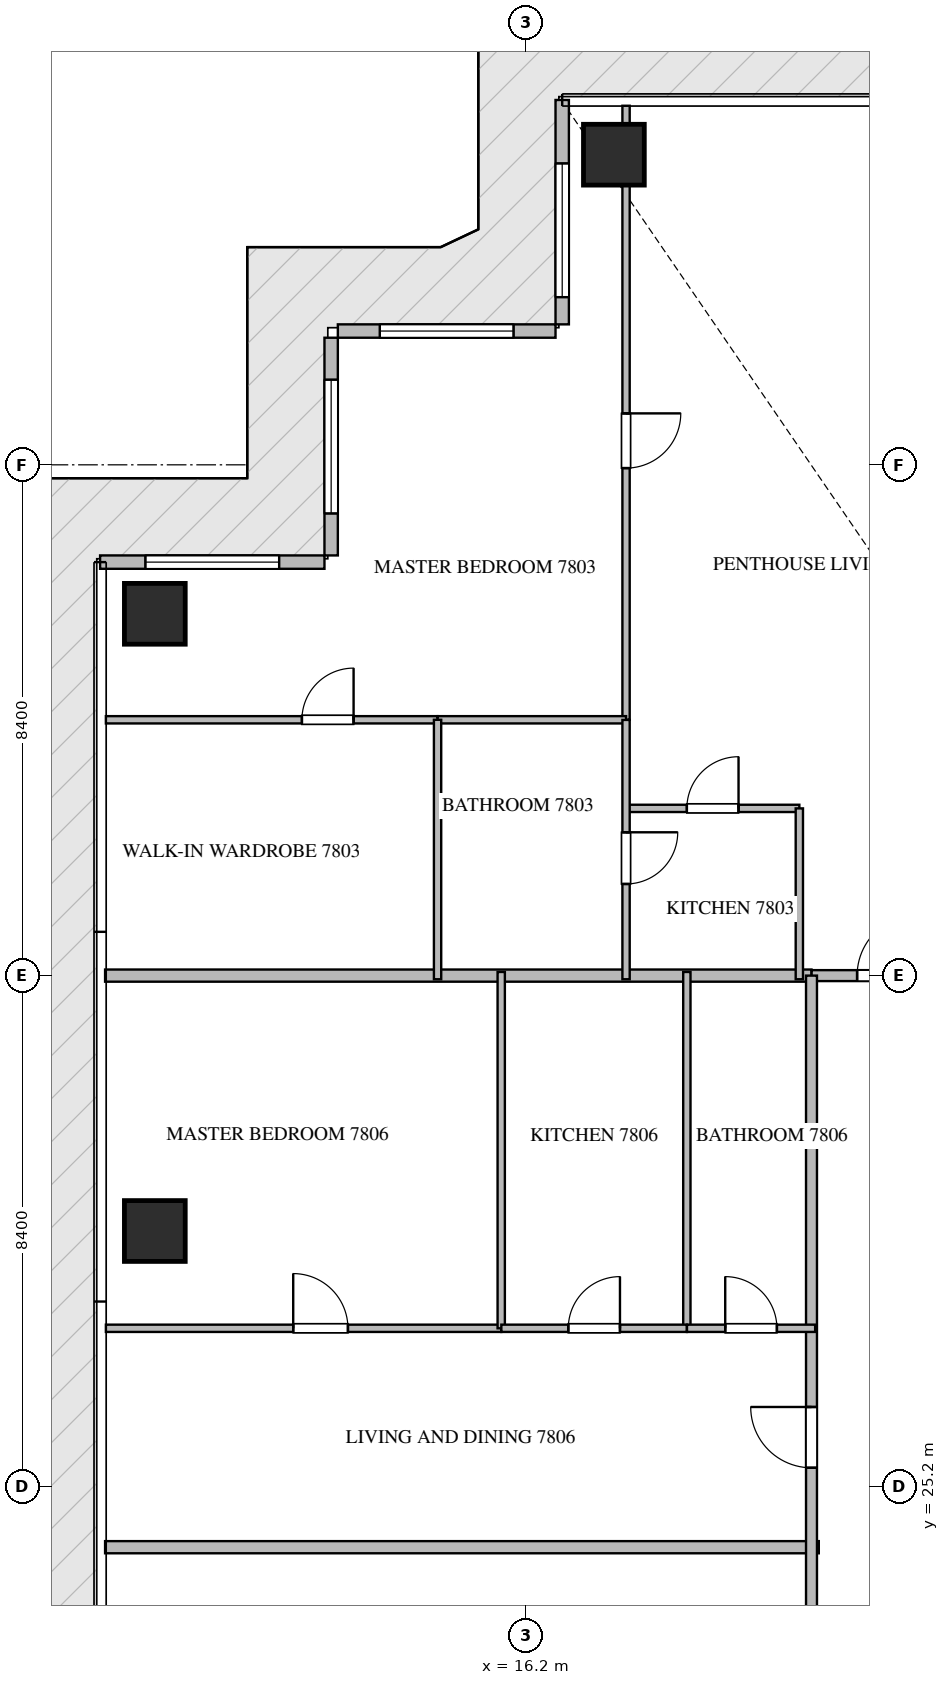
"""IFC4 building model, lengths in metres.
Left out: names, types, materials, properties, quantities, classifications, styles, units other than length and angle.
Written with IfcOpenShell. Run it as: python <this file> out.ifc"""

import sys

from ifc_helpers import new_model, si_unit, direction, frame, frame_2d, origin, origin_2d, place, context, subcontext, project, spatial, rectangle, extrude, source, transform, mapped, element, fill, save


model = new_model("IFC4")
c1 = context("Model", 3, precision=1e-05, world=origin(), true_north=direction((0.0, 1.0)))
c2 = subcontext(c1, "Body", "Model", "MODEL_VIEW")
j1 = project(units=[si_unit("LENGTHUNIT", "METRE"), si_unit("PLANEANGLEUNIT", "RADIAN")], contexts=[c1])
p1 = place(None, origin())
s1 = spatial("IfcSite", under=j1, at=p1, CompositionType="ELEMENT")
p2 = place(p1, origin())
s2 = spatial("IfcBuilding", under=s1, at=p2, CompositionType="ELEMENT")
p3 = place(p2, frame((0.0, 0.0, 313.7)))
s3 = spatial("IfcBuildingStorey", under=s2, at=p3, CompositionType="ELEMENT", Elevation=313.7)
m1 = source(origin(), c2, "Body", "SweptSolid", [
    extrude(rectangle(XDim=1.0, YDim=1.0, at=origin_2d()), origin(), (0.0, 0.0, 1.0), 4.05),
])
for number, where, z_axis, x_axis in (
    (1, (17.65, 47.1, -0.26), (0.0, 0.0, 1.0), (1.0, 0.0, 0.0)),
    (2, (10.1, 29.4, -0.26), (0.0, 0.0, 1.0), (1.0, 0.0, 0.0)),
    (3, (10.1, 39.55, -0.26), (0.0, 0.0, 1.0), (1.0, 0.0, 0.0)),
):
    element("IfcColumn", number, at=place(p3, frame(where, z_axis=z_axis, x_axis=x_axis)), inside=s3, PredefinedType="COLUMN", context=c2, shape_type="MappedRepresentation", body=[
        mapped(m1, transform((0.0, 0.0, 0.0), scale=1.0)),
    ])
p4 = place(p3, frame((16.8, 48.0, 0.0), z_axis=(0.0, 0.0, 1.0), x_axis=(0.0, -1.0, 0.0)))
e4 = element("IfcWall", 4, at=p4, inside=s3, PredefinedType="ELEMENTEDWALL", context=c2, shape_type="SweptSolid", body=[
    extrude(rectangle(XDim=3.69, YDim=0.22, at=frame_2d((1.845, 0.0))), origin(), (0.0, 0.0, 1.0), 3.775),
])
p5 = place(p4, frame((1.043, 0.0, 0.65)))
e5 = element("IfcOpeningElement", 5, at=p5, cuts=e4, PredefinedType="OPENING", context=c2, shape_type="SweptSolid", body=[
    extrude(rectangle(XDim=2.2, YDim=2.4, at=frame_2d((1.1, 1.2))), frame((0.0, 0.12, 0.0), z_axis=(0.0, -1.0, 0.0), x_axis=(1.0, 0.0, 0.0)), (0.0, 0.0, 1.0), 0.24),
])
p6 = place(p3, frame((16.69, 44.2, 0.0), z_axis=(0.0, 0.0, 1.0), x_axis=(-1.0, 0.0, 0.0)))
e6 = element("IfcWall", 6, at=p6, inside=s3, PredefinedType="ELEMENTEDWALL", context=c2, shape_type="SweptSolid", body=[
    extrude(rectangle(XDim=3.58, YDim=0.22, at=frame_2d((1.79, 0.0))), origin(), (0.0, 0.0, 1.0), 3.775),
])
p7 = place(p6, frame((0.69, 0.0, 0.65)))
e7 = element("IfcOpeningElement", 7, at=p7, cuts=e6, PredefinedType="OPENING", context=c2, shape_type="SweptSolid", body=[
    extrude(rectangle(XDim=2.2, YDim=2.4, at=frame_2d((1.1, 1.2))), frame((0.0, 0.12, 0.0), z_axis=(0.0, -1.0, 0.0), x_axis=(1.0, 0.0, 0.0)), (0.0, 0.0, 1.0), 0.24),
])
p8 = place(p3, frame((13.0, 44.09, 0.0), z_axis=(0.0, 0.0, 1.0), x_axis=(0.0, -1.0, 0.0)))
e8 = element("IfcWall", 8, at=p8, inside=s3, PredefinedType="ELEMENTEDWALL", context=c2, shape_type="SweptSolid", body=[
    extrude(rectangle(XDim=3.58, YDim=0.22, at=frame_2d((1.79, 0.0))), origin(), (0.0, 0.0, 1.0), 3.775),
])
p9 = place(p8, frame((0.69, 0.0, 0.65)))
e9 = element("IfcOpeningElement", 9, at=p9, cuts=e8, PredefinedType="OPENING", context=c2, shape_type="SweptSolid", body=[
    extrude(rectangle(XDim=2.2, YDim=2.4, at=frame_2d((1.1, 1.2))), frame((0.0, 0.12, 0.0), z_axis=(0.0, -1.0, 0.0), x_axis=(1.0, 0.0, 0.0)), (0.0, 0.0, 1.0), 0.24),
])
p10 = place(p3, frame((12.89, 40.4, 0.0), z_axis=(0.0, 0.0, 1.0), x_axis=(-1.0, 0.0, 0.0)))
e10 = element("IfcWall", 10, at=p10, inside=s3, PredefinedType="ELEMENTEDWALL", context=c2, shape_type="SweptSolid", body=[
    extrude(rectangle(XDim=3.69, YDim=0.22, at=frame_2d((1.845, 0.0))), origin(), (0.0, 0.0, 1.0), 3.775),
])
p11 = place(p10, frame((0.745, 0.0, 0.65)))
e11 = element("IfcOpeningElement", 11, at=p11, cuts=e10, PredefinedType="OPENING", context=c2, shape_type="SweptSolid", body=[
    extrude(rectangle(XDim=2.2, YDim=2.4, at=frame_2d((1.1, 1.2))), frame((0.0, 0.12, 0.0), z_axis=(0.0, -1.0, 0.0), x_axis=(1.0, 0.0, 0.0)), (0.0, 0.0, 1.0), 0.24),
])
p12 = place(p3, frame((9.282, 24.2, 0.0), z_axis=(0.0, 0.0, 1.0), x_axis=(1.0, 0.0, 0.0)))
e12 = element("IfcWall", 12, at=p12, inside=s3, PredefinedType="PARTITIONING", context=c2, shape_type="SweptSolid", body=[
    extrude(rectangle(XDim=11.738, YDim=0.2, at=frame_2d((5.869, 0.0))), origin(), (0.0, 0.0, 1.0), 3.79),
])
p13 = place(p3, frame((9.282, 33.6, 0.0), z_axis=(0.0, 0.0, 1.0), x_axis=(1.0, 0.0, 0.0)))
e13 = element("IfcWall", 13, at=p13, inside=s3, PredefinedType="PARTITIONING", context=c2, shape_type="SweptSolid", body=[
    extrude(rectangle(XDim=11.618, YDim=0.2, at=frame_2d((5.809, 0.0))), origin(), (0.0, 0.0, 1.0), 3.79),
])
p14 = place(p3, frame((20.902, 33.6, 0.0), z_axis=(0.0, 0.0, 1.0), x_axis=(1.0, 0.0, 0.0)))
e14 = element("IfcWall", 14, at=p14, inside=s3, PredefinedType="PARTITIONING", context=c2, shape_type="SweptSolid", body=[
    extrude(rectangle(XDim=2.496, YDim=0.18, at=frame_2d((1.248, 0.0))), origin(), (0.0, 0.0, 1.0), 3.79),
])
p15 = place(p14, frame((0.748, 0.0, 0.0)))
e15 = element("IfcOpeningElement", 15, at=p15, cuts=e14, PredefinedType="OPENING", context=c2, shape_type="SweptSolid", body=[
    extrude(rectangle(XDim=1.0, YDim=2.15, at=frame_2d((0.5, 1.075))), frame((0.0, 0.1, 0.0), z_axis=(0.0, -1.0, 0.0), x_axis=(1.0, 0.0, 0.0)), (0.0, 0.0, 1.0), 0.2),
])
p16 = place(p3, frame((20.9, 16.8, 0.0), z_axis=(0.0, 0.0, 1.0), x_axis=(0.0, 1.0, 0.0)))
e16 = element("IfcWall", 16, at=p16, inside=s3, PredefinedType="PARTITIONING", context=c2, shape_type="SweptSolid", body=[
    extrude(rectangle(XDim=16.8, YDim=0.18, at=frame_2d((8.4, 0.0))), origin(), (0.0, 0.0, 1.0), 3.79),
])
p17 = place(p16, frame((4.503, 0.0, 0.0)))
e17 = element("IfcOpeningElement", 17, at=p17, cuts=e16, PredefinedType="OPENING", context=c2, shape_type="SweptSolid", body=[
    extrude(rectangle(XDim=1.0, YDim=2.15, at=frame_2d((0.5, 1.075))), frame((0.0, 0.1, 0.0), z_axis=(0.0, -1.0, 0.0), x_axis=(1.0, 0.0, 0.0)), (0.0, 0.0, 1.0), 0.2),
])
p18 = place(p16, frame((8.706, 0.0, 0.0)))
e18 = element("IfcOpeningElement", 18, at=p18, cuts=e16, PredefinedType="OPENING", context=c2, shape_type="SweptSolid", body=[
    extrude(rectangle(XDim=1.0, YDim=2.15, at=frame_2d((0.5, 1.075))), frame((0.0, 0.1, 0.0), z_axis=(0.0, -1.0, 0.0), x_axis=(1.0, 0.0, 0.0)), (0.0, 0.0, 1.0), 0.2),
])
p19 = place(p3, frame((17.85, 36.35, 0.0), z_axis=(0.0, 0.0, 1.0), x_axis=(1.0, 0.0, 0.0)))
e19 = element("IfcWall", 19, at=p19, inside=s3, PredefinedType="PARTITIONING", context=c2, shape_type="SweptSolid", body=[
    extrude(rectangle(XDim=2.85, YDim=0.12, at=frame_2d((1.425, 0.0))), origin(), (0.0, 0.0, 1.0), 3.79),
])
p20 = place(p19, frame((1.0, 0.0, 0.0)))
e20 = element("IfcOpeningElement", 20, at=p20, cuts=e19, PredefinedType="OPENING", context=c2, shape_type="SweptSolid", body=[
    extrude(rectangle(XDim=0.85, YDim=2.1, at=frame_2d((0.425, 1.05))), frame((0.0, 0.07, 0.0), z_axis=(0.0, -1.0, 0.0), x_axis=(1.0, 0.0, 0.0)), (0.0, 0.0, 1.0), 0.14),
])
p21 = place(p3, frame((20.7, 36.35, 0.0), z_axis=(0.0, 0.0, 1.0), x_axis=(0.0, -1.0, 0.0)))
e21 = element("IfcWall", 21, at=p21, inside=s3, PredefinedType="PARTITIONING", context=c2, shape_type="SweptSolid", body=[
    extrude(rectangle(XDim=2.81, YDim=0.12, at=frame_2d((1.405, 0.0))), origin(), (0.0, 0.0, 1.0), 3.79),
])
p22 = place(p3, frame((17.85, 47.905, 0.0), z_axis=(0.0, 0.0, 1.0), x_axis=(0.0, -1.0, 0.0)))
e22 = element("IfcWall", 22, at=p22, inside=s3, PredefinedType="PARTITIONING", context=c2, shape_type="SweptSolid", body=[
    extrude(rectangle(XDim=10.098, YDim=0.12, at=frame_2d((5.049, 0.0))), origin(), (0.0, 0.0, 1.0), 3.292),
])
p23 = place(p22, frame((5.059, 0.0, 0.0)))
e23 = element("IfcOpeningElement", 23, at=p23, cuts=e22, PredefinedType="OPENING", context=c2, shape_type="SweptSolid", body=[
    extrude(rectangle(XDim=0.9, YDim=2.1, at=frame_2d((0.45, 1.05))), frame((0.0, 0.07, 0.0), z_axis=(0.0, -1.0, 0.0), x_axis=(1.0, 0.0, 0.0)), (0.0, 0.0, 1.0), 0.14),
])
p24 = place(p3, frame((9.295, 37.807, 0.0), z_axis=(0.0, 0.0, 1.0), x_axis=(1.0, 0.0, 0.0)))
e24 = element("IfcWall", 24, at=p24, inside=s3, PredefinedType="PARTITIONING", context=c2, shape_type="SweptSolid", body=[
    extrude(rectangle(XDim=5.455, YDim=0.12, at=frame_2d((2.728, 0.0))), origin(), (0.0, 0.0, 1.0), 3.79),
])
p25 = place(p24, frame((3.224, 0.0, 0.0)))
e25 = element("IfcOpeningElement", 25, at=p25, cuts=e24, PredefinedType="OPENING", context=c2, shape_type="SweptSolid", body=[
    extrude(rectangle(XDim=0.85, YDim=2.1, at=frame_2d((0.425, 1.05))), frame((0.0, 0.07, 0.0), z_axis=(0.0, -1.0, 0.0), x_axis=(1.0, 0.0, 0.0)), (0.0, 0.0, 1.0), 0.14),
])
p26 = place(p3, frame((14.752, 37.807, 0.0), z_axis=(0.0, 0.0, 1.0), x_axis=(1.0, 0.0, 0.0)))
e26 = element("IfcWall", 26, at=p26, inside=s3, PredefinedType="PARTITIONING", context=c2, shape_type="SweptSolid", body=[
    extrude(rectangle(XDim=3.098, YDim=0.12, at=frame_2d((1.549, 0.0))), origin(), (0.0, 0.0, 1.0), 3.79),
])
p27 = place(p3, frame((14.75, 37.807, 0.0), z_axis=(0.0, 0.0, 1.0), x_axis=(0.0, -1.0, 0.0)))
e27 = element("IfcWall", 27, at=p27, inside=s3, PredefinedType="PARTITIONING", context=c2, shape_type="SweptSolid", body=[
    extrude(rectangle(XDim=4.267, YDim=0.12, at=frame_2d((2.133, 0.0))), origin(), (0.0, 0.0, 1.0), 3.79),
])
p28 = place(p3, frame((17.85, 37.805, 0.0), z_axis=(0.0, 0.0, 1.0), x_axis=(0.0, -1.0, 0.0)))
e28 = element("IfcWall", 28, at=p28, inside=s3, PredefinedType="PARTITIONING", context=c2, shape_type="SweptSolid", body=[
    extrude(rectangle(XDim=4.265, YDim=0.12, at=frame_2d((2.132, 0.0))), origin(), (0.0, 0.0, 1.0), 3.372),
])
p29 = place(p28, frame((1.848, 0.0, 0.0)))
e29 = element("IfcOpeningElement", 29, at=p29, cuts=e28, PredefinedType="OPENING", context=c2, shape_type="SweptSolid", body=[
    extrude(rectangle(XDim=0.85, YDim=2.1, at=frame_2d((0.425, 1.05))), frame((0.0, 0.07, 0.0), z_axis=(0.0, -1.0, 0.0), x_axis=(1.0, 0.0, 0.0)), (0.0, 0.0, 1.0), 0.14),
])
p30 = place(p3, frame((9.295, 27.8, 0.0), z_axis=(0.0, 0.0, 1.0), x_axis=(1.0, 0.0, 0.0)))
e30 = element("IfcWall", 30, at=p30, inside=s3, PredefinedType="PARTITIONING", context=c2, shape_type="SweptSolid", body=[
    extrude(rectangle(XDim=6.502, YDim=0.12, at=frame_2d((3.251, 0.0))), origin(), (0.0, 0.0, 1.0), 3.79),
])
p31 = place(p30, frame((3.081, 0.0, 0.0)))
e31 = element("IfcOpeningElement", 31, at=p31, cuts=e30, PredefinedType="OPENING", context=c2, shape_type="SweptSolid", body=[
    extrude(rectangle(XDim=0.9, YDim=2.1, at=frame_2d((0.45, 1.05))), frame((0.0, 0.07, 0.0), z_axis=(0.0, -1.0, 0.0), x_axis=(1.0, 0.0, 0.0)), (0.0, 0.0, 1.0), 0.14),
])
for number, where, z_axis, x_axis in (
    (32, (15.797, 27.8, 0.0), (0.0, 0.0, 1.0), (0.0, 1.0, 0.0)),
    (33, (18.85, 27.8, 0.0), (0.0, 0.0, 1.0), (0.0, 1.0, 0.0)),
):
    element("IfcWall", number, at=place(p3, frame(where, z_axis=z_axis, x_axis=x_axis)), inside=s3, PredefinedType="PARTITIONING", context=c2, shape_type="SweptSolid", body=[
        extrude(rectangle(XDim=5.86, YDim=0.12, at=frame_2d((2.93, 0.0))), origin(), (0.0, 0.0, 1.0), 3.79),
    ])
p32 = place(p3, frame((15.799, 27.8, 0.0), z_axis=(0.0, 0.0, 1.0), x_axis=(1.0, 0.0, 0.0)))
e34 = element("IfcWall", 34, at=p32, inside=s3, PredefinedType="PARTITIONING", context=c2, shape_type="SweptSolid", body=[
    extrude(rectangle(XDim=3.051, YDim=0.12, at=frame_2d((1.525, 0.0))), origin(), (0.0, 0.0, 1.0), 3.79),
])
p33 = place(p32, frame((1.101, 0.0, 0.0)))
e35 = element("IfcOpeningElement", 35, at=p33, cuts=e34, PredefinedType="OPENING", context=c2, shape_type="SweptSolid", body=[
    extrude(rectangle(XDim=0.85, YDim=2.1, at=frame_2d((0.425, 1.05))), frame((0.0, 0.07, 0.0), z_axis=(0.0, -1.0, 0.0), x_axis=(1.0, 0.0, 0.0)), (0.0, 0.0, 1.0), 0.14),
])
p34 = place(p3, frame((18.852, 27.8, 0.0), z_axis=(0.0, 0.0, 1.0), x_axis=(1.0, 0.0, 0.0)))
e36 = element("IfcWall", 36, at=p34, inside=s3, PredefinedType="PARTITIONING", context=c2, shape_type="SweptSolid", body=[
    extrude(rectangle(XDim=2.108, YDim=0.12, at=frame_2d((1.054, 0.0))), origin(), (0.0, 0.0, 1.0), 3.79),
])
p35 = place(p34, frame((0.629, 0.0, 0.0)))
e37 = element("IfcOpeningElement", 37, at=p35, cuts=e36, PredefinedType="OPENING", context=c2, shape_type="SweptSolid", body=[
    extrude(rectangle(XDim=0.85, YDim=2.1, at=frame_2d((0.425, 1.05))), frame((0.0, 0.07, 0.0), z_axis=(0.0, -1.0, 0.0), x_axis=(1.0, 0.0, 0.0)), (0.0, 0.0, 1.0), 0.14),
])
m2 = source(origin(), c2, "Body", "SweptSolid", [
    extrude(rectangle(XDim=2.2, YDim=2.4, at=frame_2d((1.1, 1.2))), frame((0.0, 0.03, 0.0), z_axis=(0.0, -1.0, 0.0), x_axis=(1.0, 0.0, 0.0)), (0.0, 0.0, 1.0), 0.06),
])
p36 = place(p5, origin())
e38 = element("IfcWindow", 38, at=p36, inside=s3, PartitioningType="SINGLE_PANEL", PredefinedType="WINDOW", context=c2, shape_type="MappedRepresentation", body=[
    mapped(m2, transform((0.0, 0.0, 0.0), scale=1.0)),
])
fill(e5, e38)
p37 = place(p7, origin())
e39 = element("IfcWindow", 39, at=p37, inside=s3, PartitioningType="SINGLE_PANEL", PredefinedType="WINDOW", context=c2, shape_type="MappedRepresentation", body=[
    mapped(m2, transform((0.0, 0.0, 0.0), scale=1.0)),
])
fill(e7, e39)
p38 = place(p9, origin())
e40 = element("IfcWindow", 40, at=p38, inside=s3, PartitioningType="SINGLE_PANEL", PredefinedType="WINDOW", context=c2, shape_type="MappedRepresentation", body=[
    mapped(m2, transform((0.0, 0.0, 0.0), scale=1.0)),
])
fill(e9, e40)
p39 = place(p11, origin())
e41 = element("IfcWindow", 41, at=p39, inside=s3, PartitioningType="SINGLE_PANEL", PredefinedType="WINDOW", context=c2, shape_type="MappedRepresentation", body=[
    mapped(m2, transform((0.0, 0.0, 0.0), scale=1.0)),
])
fill(e11, e41)
m3 = source(origin(), c2, "Body", "SweptSolid", [
    extrude(rectangle(XDim=1.0, YDim=2.15, at=frame_2d((0.5, 1.075))), frame((0.0, 0.025, 0.0), z_axis=(0.0, -1.0, 0.0), x_axis=(1.0, 0.0, 0.0)), (0.0, 0.0, 1.0), 0.05),
])
p40 = place(p15, origin())
e42 = element("IfcDoor", 42, at=p40, inside=s3, OperationType="SINGLE_SWING_RIGHT", PredefinedType="DOOR", context=c2, shape_type="MappedRepresentation", body=[
    mapped(m3, transform((0.0, 0.0, 0.0), scale=1.0)),
])
fill(e15, e42)
p41 = place(p18, origin())
e43 = element("IfcDoor", 43, at=p41, inside=s3, OperationType="SINGLE_SWING_RIGHT", PredefinedType="DOOR", context=c2, shape_type="MappedRepresentation", body=[
    mapped(m3, transform((0.0, 0.0, 0.0), scale=1.0)),
])
fill(e18, e43)
m4 = source(origin(), c2, "Body", "SweptSolid", [
    extrude(rectangle(XDim=0.85, YDim=2.1, at=frame_2d((0.425, 1.05))), frame((0.0, 0.025, 0.0), z_axis=(0.0, -1.0, 0.0), x_axis=(1.0, 0.0, 0.0)), (0.0, 0.0, 1.0), 0.05),
])
p42 = place(p20, origin())
e44 = element("IfcDoor", 44, at=p42, inside=s3, OperationType="SINGLE_SWING_RIGHT", PredefinedType="DOOR", context=c2, shape_type="MappedRepresentation", body=[
    mapped(m4, transform((0.0, 0.0, 0.0), scale=1.0)),
])
fill(e20, e44)
m5 = source(origin(), c2, "Body", "SweptSolid", [
    extrude(rectangle(XDim=0.9, YDim=2.1, at=frame_2d((0.45, 1.05))), frame((0.0, 0.025, 0.0), z_axis=(0.0, -1.0, 0.0), x_axis=(1.0, 0.0, 0.0)), (0.0, 0.0, 1.0), 0.05),
])
p43 = place(p23, origin())
e45 = element("IfcDoor", 45, at=p43, inside=s3, OperationType="SINGLE_SWING_LEFT", PredefinedType="DOOR", context=c2, shape_type="MappedRepresentation", body=[
    mapped(m5, transform((0.0, 0.0, 0.0), scale=1.0)),
])
fill(e23, e45)
p44 = place(p25, origin())
e46 = element("IfcDoor", 46, at=p44, inside=s3, OperationType="SINGLE_SWING_RIGHT", PredefinedType="DOOR", context=c2, shape_type="MappedRepresentation", body=[
    mapped(m4, transform((0.0, 0.0, 0.0), scale=1.0)),
])
fill(e25, e46)
p45 = place(p29, origin())
e47 = element("IfcDoor", 47, at=p45, inside=s3, OperationType="SINGLE_SWING_LEFT", PredefinedType="DOOR", context=c2, shape_type="MappedRepresentation", body=[
    mapped(m4, transform((0.0, 0.0, 0.0), scale=1.0)),
])
fill(e29, e47)
p46 = place(p31, origin())
e48 = element("IfcDoor", 48, at=p46, inside=s3, OperationType="SINGLE_SWING_LEFT", PredefinedType="DOOR", context=c2, shape_type="MappedRepresentation", body=[
    mapped(m5, transform((0.0, 0.0, 0.0), scale=1.0)),
])
fill(e31, e48)
p47 = place(p33, origin())
e49 = element("IfcDoor", 49, at=p47, inside=s3, OperationType="SINGLE_SWING_RIGHT", PredefinedType="DOOR", context=c2, shape_type="MappedRepresentation", body=[
    mapped(m4, transform((0.0, 0.0, 0.0), scale=1.0)),
])
fill(e35, e49)
p48 = place(p35, origin())
e50 = element("IfcDoor", 50, at=p48, inside=s3, OperationType="SINGLE_SWING_LEFT", PredefinedType="DOOR", context=c2, shape_type="MappedRepresentation", body=[
    mapped(m4, transform((0.0, 0.0, 0.0), scale=1.0)),
])
fill(e37, e50)
save(model, sys.argv[1])
